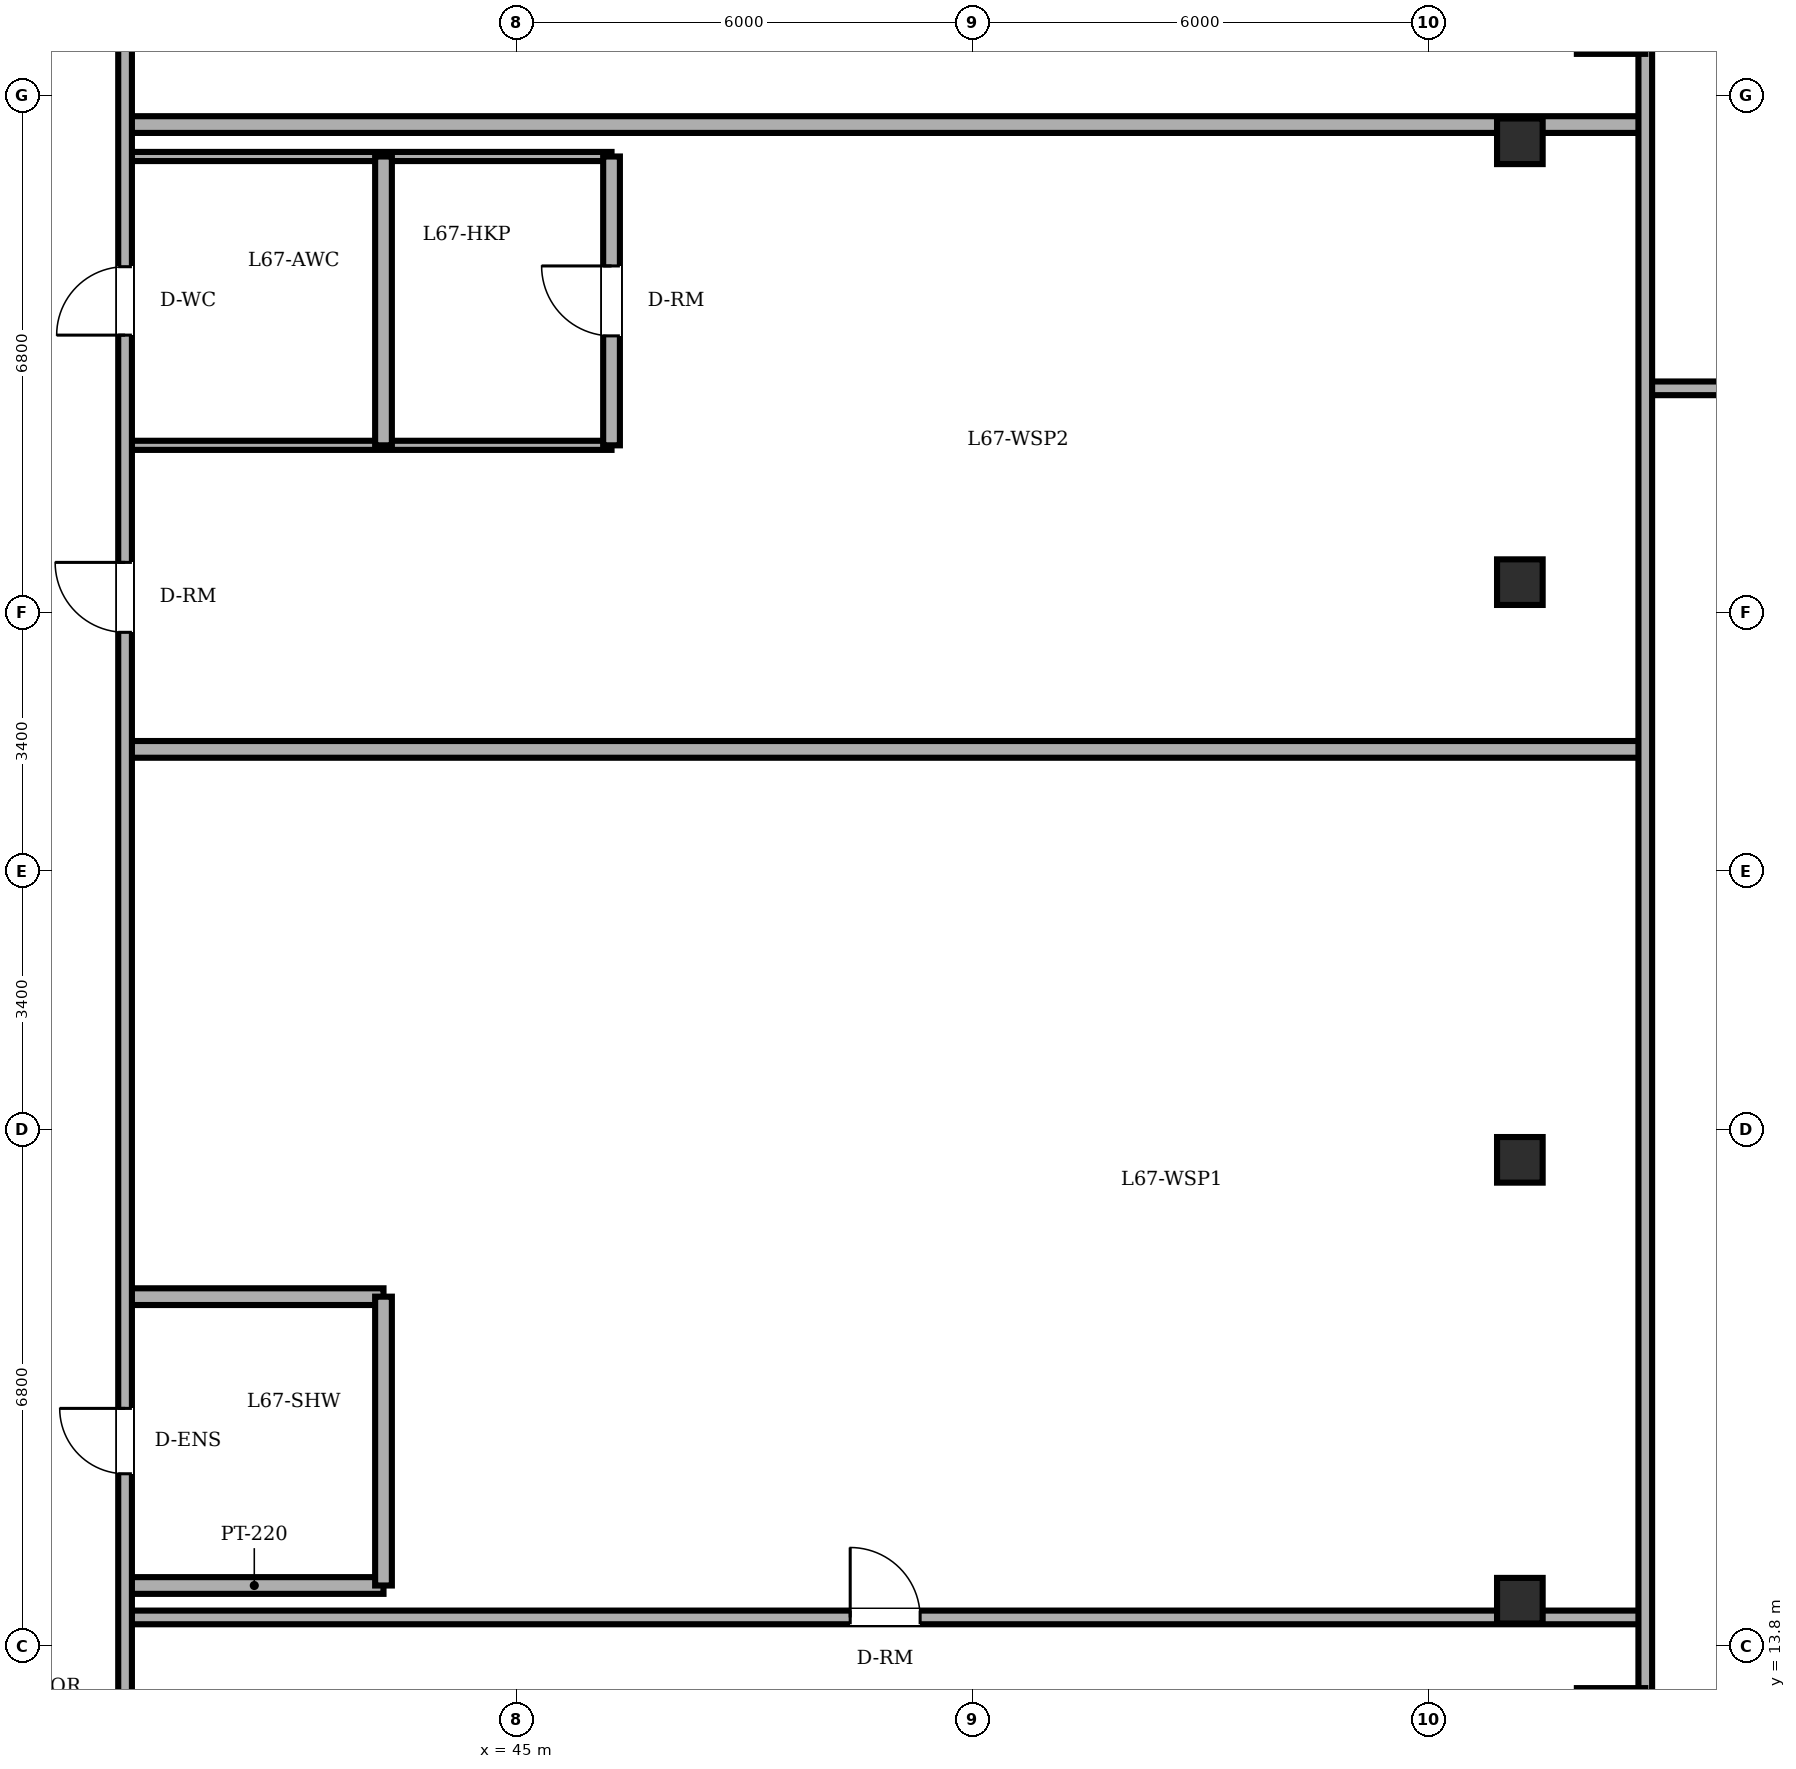
"""IFC4 building model, lengths in metres.
Left out: names, types, materials, properties, quantities, classifications, styles, units other than length and angle.
Written with IfcOpenShell. Run it as: python <this file> out.ifc"""

import sys

from ifc_helpers import new_model, si_unit, direction, frame, frame_2d, origin, origin_2d, place, context, subcontext, project, spatial, rectangle, circle, extrude, element, fill, save


model = new_model("IFC4")
c1 = context("Model", 3, precision=1e-05, world=origin(), true_north=direction((0.0, 1.0)))
c2 = subcontext(c1, "Body", "Model", "MODEL_VIEW")
j1 = project(units=[si_unit("LENGTHUNIT", "METRE"), si_unit("PLANEANGLEUNIT", "RADIAN")], contexts=[c1])
p1 = place(None, origin())
s1 = spatial("IfcSite", under=j1, at=p1, CompositionType="ELEMENT")
p2 = place(p1, origin())
s2 = spatial("IfcBuilding", under=s1, at=p2, CompositionType="ELEMENT")
p3 = place(p2, frame((0.0, 0.0, 258.8)))
s3 = spatial("IfcBuildingStorey", under=s2, at=p3, CompositionType="ELEMENT", Elevation=258.8)
for number, where, z_axis, x_axis in (
    (1, (59.4, 12.8, 0.0), (0.0, 0.0, 1.0), (1.0, 0.0, 0.0)),
    (2, (59.4, 35.2, 0.0), (0.0, 0.0, 1.0), (1.0, 0.0, 0.0)),
):
    element("IfcColumn", number, at=place(p3, frame(where, z_axis=z_axis, x_axis=x_axis)), inside=s3, PredefinedType="COLUMN", context=c2, shape_type="SweptSolid", body=[
        extrude(circle(Radius=0.45, at=origin_2d()), origin(), (0.0, 0.0, 1.0), 3.65),
    ])
for number, where, z_axis, x_axis in (
    (3, (58.2, 14.4, 0.0), (0.0, 0.0, 1.0), (1.0, 0.0, 0.0)),
    (4, (58.2, 20.2, 0.0), (0.0, 0.0, 1.0), (1.0, 0.0, 0.0)),
    (5, (58.2, 27.8, 0.0), (0.0, 0.0, 1.0), (1.0, 0.0, 0.0)),
    (6, (58.2, 33.6, 0.0), (0.0, 0.0, 1.0), (1.0, 0.0, 0.0)),
):
    element("IfcColumn", number, at=place(p3, frame(where, z_axis=z_axis, x_axis=x_axis)), inside=s3, PredefinedType="COLUMN", context=c2, shape_type="SweptSolid", body=[
        extrude(rectangle(XDim=0.6, YDim=0.6, at=origin_2d()), origin(), (0.0, 0.0, 1.0), 3.65),
    ])
p4 = place(p3, frame((39.85, 14.18, 0.0), z_axis=(0.0, 0.0, 1.0), x_axis=(1.0, 0.0, 0.0)))
e7 = element("IfcWall", 7, at=p4, inside=s3, PredefinedType="PARTITIONING", context=c2, shape_type="SweptSolid", body=[
    extrude(rectangle(XDim=20.0, YDim=0.18, at=frame_2d((10.0, 0.0))), origin(), (0.0, 0.0, 1.0), 3.092),
])
p5 = place(p4, frame((9.54, 0.0, 0.0)))
e8 = element("IfcOpeningElement", 8, at=p5, cuts=e7, PredefinedType="OPENING", context=c2, shape_type="SweptSolid", body=[
    extrude(rectangle(XDim=0.92, YDim=2.1, at=frame_2d((0.46, 1.05))), frame((0.0, 0.1, 0.0), z_axis=(0.0, -1.0, 0.0), x_axis=(1.0, 0.0, 0.0)), (0.0, 0.0, 1.0), 0.2),
])
p6 = place(p3, frame((39.85, 14.6, 0.0), z_axis=(0.0, 0.0, 1.0), x_axis=(1.0, 0.0, 0.0)))
e9 = element("IfcWall", 9, at=p6, inside=s3, PredefinedType="PARTITIONING", context=c2, shape_type="SweptSolid", body=[
    extrude(rectangle(XDim=3.4, YDim=0.22, at=frame_2d((1.7, 0.0))), origin(), (0.0, 0.0, 1.0), 3.092),
])
p7 = place(p3, frame((39.85, 18.4, 0.0), z_axis=(0.0, 0.0, 1.0), x_axis=(1.0, 0.0, 0.0)))
e10 = element("IfcWall", 10, at=p7, inside=s3, PredefinedType="PARTITIONING", context=c2, shape_type="SweptSolid", body=[
    extrude(rectangle(XDim=3.4, YDim=0.22, at=frame_2d((1.7, 0.0))), origin(), (0.0, 0.0, 1.0), 3.072),
])
p8 = place(p3, frame((39.85, 25.6, 0.0), z_axis=(0.0, 0.0, 1.0), x_axis=(1.0, 0.0, 0.0)))
e11 = element("IfcWall", 11, at=p8, inside=s3, PredefinedType="PARTITIONING", context=c2, shape_type="SweptSolid", body=[
    extrude(rectangle(XDim=20.0, YDim=0.22, at=frame_2d((10.0, 0.0))), origin(), (0.0, 0.0, 1.0), 3.45),
])
p9 = place(p3, frame((39.85, 29.6, 0.0), z_axis=(0.0, 0.0, 1.0), x_axis=(1.0, 0.0, 0.0)))
e12 = element("IfcWall", 12, at=p9, inside=s3, PredefinedType="PARTITIONING", context=c2, shape_type="SweptSolid", body=[
    extrude(rectangle(XDim=6.4, YDim=0.12, at=frame_2d((3.2, 0.0))), origin(), (0.0, 0.0, 1.0), 3.072),
])
p10 = place(p3, frame((59.85, 30.35, 0.0), z_axis=(0.0, 0.0, 1.0), x_axis=(1.0, 0.0, 0.0)))
e13 = element("IfcWall", 13, at=p10, inside=s3, PredefinedType="PARTITIONING", context=c2, shape_type="SweptSolid", body=[
    extrude(rectangle(XDim=15.139, YDim=0.18, at=frame_2d((7.569, 0.0))), origin(), (0.0, 0.0, 1.0), 3.45),
])
p11 = place(p10, frame((0.975, 0.0, 0.0)))
e14 = element("IfcOpeningElement", 14, at=p11, cuts=e13, PredefinedType="OPENING", context=c2, shape_type="SweptSolid", body=[
    extrude(rectangle(XDim=0.92, YDim=2.1, at=frame_2d((0.46, 1.05))), frame((0.0, 0.1, 0.0), z_axis=(0.0, -1.0, 0.0), x_axis=(1.0, 0.0, 0.0)), (0.0, 0.0, 1.0), 0.2),
])
p12 = place(p3, frame((39.85, 33.4, 0.0), z_axis=(0.0, 0.0, 1.0), x_axis=(1.0, 0.0, 0.0)))
e15 = element("IfcWall", 15, at=p12, inside=s3, PredefinedType="PARTITIONING", context=c2, shape_type="SweptSolid", body=[
    extrude(rectangle(XDim=6.4, YDim=0.12, at=frame_2d((3.2, 0.0))), origin(), (0.0, 0.0, 1.0), 3.092),
])
p13 = place(p3, frame((39.85, 33.82, 0.0), z_axis=(0.0, 0.0, 1.0), x_axis=(1.0, 0.0, 0.0)))
e16 = element("IfcWall", 16, at=p13, inside=s3, PredefinedType="PARTITIONING", context=c2, shape_type="SweptSolid", body=[
    extrude(rectangle(XDim=20.0, YDim=0.22, at=frame_2d((10.0, 0.0))), origin(), (0.0, 0.0, 1.0), 3.092),
])
p14 = place(p3, frame((39.85, 10.8, 0.0), z_axis=(0.0, 0.0, 1.0), x_axis=(0.0, 1.0, 0.0)))
e17 = element("IfcWall", 17, at=p14, inside=s3, PredefinedType="PARTITIONING", context=c2, shape_type="SweptSolid", body=[
    extrude(rectangle(XDim=26.4, YDim=0.18, at=frame_2d((13.2, 0.0))), origin(), (0.0, 0.0, 1.0), 3.45),
])
p15 = place(p14, frame((20.25, 0.0, 0.0)))
e18 = element("IfcOpeningElement", 18, at=p15, cuts=e17, PredefinedType="OPENING", context=c2, shape_type="SweptSolid", body=[
    extrude(rectangle(XDim=0.9, YDim=2.1, at=frame_2d((0.45, 1.05))), frame((0.0, 0.1, 0.0), z_axis=(0.0, -1.0, 0.0), x_axis=(1.0, 0.0, 0.0)), (0.0, 0.0, 1.0), 0.2),
])
p16 = place(p14, frame((5.27, 0.0, 0.0)))
e19 = element("IfcOpeningElement", 19, at=p16, cuts=e17, PredefinedType="OPENING", context=c2, shape_type="SweptSolid", body=[
    extrude(rectangle(XDim=0.86, YDim=2.1, at=frame_2d((0.43, 1.05))), frame((0.0, 0.1, 0.0), z_axis=(0.0, -1.0, 0.0), x_axis=(1.0, 0.0, 0.0)), (0.0, 0.0, 1.0), 0.2),
])
p17 = place(p14, frame((16.34, 0.0, 0.0)))
e20 = element("IfcOpeningElement", 20, at=p17, cuts=e17, PredefinedType="OPENING", context=c2, shape_type="SweptSolid", body=[
    extrude(rectangle(XDim=0.92, YDim=2.1, at=frame_2d((0.46, 1.05))), frame((0.0, 0.1, 0.0), z_axis=(0.0, -1.0, 0.0), x_axis=(1.0, 0.0, 0.0)), (0.0, 0.0, 1.0), 0.2),
])
for number, where, z_axis, x_axis in (
    (21, (43.25, 14.6, 0.0), (0.0, 0.0, 1.0), (0.0, 1.0, 0.0)),
    (22, (43.25, 29.6, 0.0), (0.0, 0.0, 1.0), (0.0, 1.0, 0.0)),
):
    element("IfcWall", number, at=place(p3, frame(where, z_axis=z_axis, x_axis=x_axis)), inside=s3, PredefinedType="PARTITIONING", context=c2, shape_type="SweptSolid", body=[
        extrude(rectangle(XDim=3.8, YDim=0.22, at=frame_2d((1.9, 0.0))), origin(), (0.0, 0.0, 1.0), 3.45),
    ])
p18 = place(p3, frame((46.25, 29.6, 0.0), z_axis=(0.0, 0.0, 1.0), x_axis=(0.0, 1.0, 0.0)))
e23 = element("IfcWall", 23, at=p18, inside=s3, PredefinedType="PARTITIONING", context=c2, shape_type="SweptSolid", body=[
    extrude(rectangle(XDim=3.8, YDim=0.22, at=frame_2d((1.9, 0.0))), origin(), (0.0, 0.0, 1.0), 3.45),
])
p19 = place(p18, frame((1.44, 0.0, 0.0)))
e24 = element("IfcOpeningElement", 24, at=p19, cuts=e23, PredefinedType="OPENING", context=c2, shape_type="SweptSolid", body=[
    extrude(rectangle(XDim=0.92, YDim=2.1, at=frame_2d((0.46, 1.05))), frame((0.0, 0.12, 0.0), z_axis=(0.0, -1.0, 0.0), x_axis=(1.0, 0.0, 0.0)), (0.0, 0.0, 1.0), 0.24),
])
p20 = place(p3, frame((59.85, 10.8, 0.0), z_axis=(0.0, 0.0, 1.0), x_axis=(0.0, 1.0, 0.0)))
e25 = element("IfcWall", 25, at=p20, inside=s3, PredefinedType="PARTITIONING", context=c2, shape_type="SweptSolid", body=[
    extrude(rectangle(XDim=26.4, YDim=0.18, at=frame_2d((13.2, 0.0))), origin(), (0.0, 0.0, 1.0), 3.45),
])
p21 = place(p15, origin())
e26 = element("IfcDoor", 26, at=p21, inside=s3, OperationType="SINGLE_SWING_LEFT", PredefinedType="DOOR", context=c2, shape_type="SweptSolid", body=[
    extrude(rectangle(XDim=0.9, YDim=2.1, at=frame_2d((0.45, 1.05))), frame((0.0, 0.025, 0.0), z_axis=(0.0, -1.0, 0.0), x_axis=(1.0, 0.0, 0.0)), (0.0, 0.0, 1.0), 0.05),
])
fill(e18, e26)
p22 = place(p16, origin())
e27 = element("IfcDoor", 27, at=p22, inside=s3, OperationType="SINGLE_SWING_RIGHT", PredefinedType="DOOR", context=c2, shape_type="SweptSolid", body=[
    extrude(rectangle(XDim=0.86, YDim=2.1, at=frame_2d((0.43, 1.05))), frame((0.0, 0.025, 0.0), z_axis=(0.0, -1.0, 0.0), x_axis=(1.0, 0.0, 0.0)), (0.0, 0.0, 1.0), 0.05),
])
fill(e19, e27)
p23 = place(p5, origin())
e28 = element("IfcDoor", 28, at=p23, inside=s3, OperationType="SINGLE_SWING_LEFT", PredefinedType="DOOR", context=c2, shape_type="SweptSolid", body=[
    extrude(rectangle(XDim=0.92, YDim=2.1, at=frame_2d((0.46, 1.05))), frame((0.0, 0.025, 0.0), z_axis=(0.0, -1.0, 0.0), x_axis=(1.0, 0.0, 0.0)), (0.0, 0.0, 1.0), 0.05),
])
fill(e8, e28)
p24 = place(p17, origin())
e29 = element("IfcDoor", 29, at=p24, inside=s3, OperationType="SINGLE_SWING_RIGHT", PredefinedType="DOOR", context=c2, shape_type="SweptSolid", body=[
    extrude(rectangle(XDim=0.92, YDim=2.1, at=frame_2d((0.46, 1.05))), frame((0.0, 0.025, 0.0), z_axis=(0.0, -1.0, 0.0), x_axis=(1.0, 0.0, 0.0)), (0.0, 0.0, 1.0), 0.05),
])
fill(e20, e29)
p25 = place(p19, origin())
e30 = element("IfcDoor", 30, at=p25, inside=s3, OperationType="SINGLE_SWING_RIGHT", PredefinedType="DOOR", context=c2, shape_type="SweptSolid", body=[
    extrude(rectangle(XDim=0.92, YDim=2.1, at=frame_2d((0.46, 1.05))), frame((0.0, 0.025, 0.0), z_axis=(0.0, -1.0, 0.0), x_axis=(1.0, 0.0, 0.0)), (0.0, 0.0, 1.0), 0.05),
])
fill(e24, e30)
save(model, sys.argv[1])
